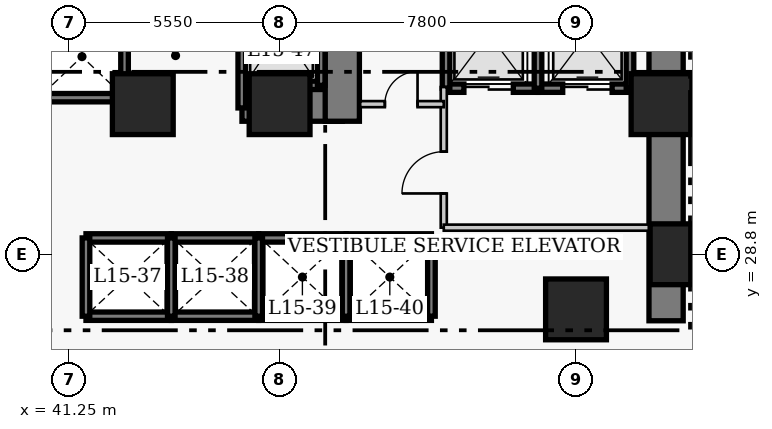
"""IFC4 building model, lengths in metres.
Left out: names, types, materials, properties, quantities, classifications, styles, units other than length and angle.
Written with IfcOpenShell. Run it as: python <this file> out.ifc"""

import sys

from ifc_helpers import new_model, si_unit, direction, frame, frame_2d, origin, origin_2d, place, context, subcontext, project, spatial, rectangle, extrude, element, fill, save


model = new_model("IFC4")
c1 = context("Model", 3, precision=1e-05, world=origin(), true_north=direction((0.0, 1.0)))
c2 = subcontext(c1, "Body", "Model", "MODEL_VIEW")
j1 = project(units=[si_unit("LENGTHUNIT", "METRE"), si_unit("PLANEANGLEUNIT", "RADIAN")], contexts=[c1])
p1 = place(None, origin())
s1 = spatial("IfcSite", under=j1, at=p1, CompositionType="ELEMENT")
p2 = place(p1, origin())
s2 = spatial("IfcBuilding", under=s1, at=p2, CompositionType="ELEMENT")
p3 = place(p2, frame((0.0, 0.0, 64.0)))
s3 = spatial("IfcBuildingStorey", under=s2, at=p3, CompositionType="ELEMENT", Elevation=64.0)
p4 = place(p3, frame((56.97, 27.05, 0.0), z_axis=(0.0, 0.0, 1.0), x_axis=(0.0, 1.0, 0.0)))
e1 = element("IfcWall", 1, at=p4, inside=s3, PredefinedType="SHEAR", context=c2, shape_type="SweptSolid", body=[
    extrude(rectangle(XDim=13.72, YDim=0.9, at=frame_2d((6.86, 0.0))), origin(), (0.0, 0.0, 1.0), 3.8),
])
p5 = place(p3, frame((45.81, 32.75, 0.0), z_axis=(0.0, 0.0, 1.0), x_axis=(1.0, 0.0, 0.0)))
e2 = element("IfcWall", 2, at=p5, inside=s3, PredefinedType="SHEAR", context=c2, shape_type="SweptSolid", body=[
    extrude(rectangle(XDim=2.64, YDim=0.9, at=frame_2d((1.32, 0.0))), origin(), (0.0, 0.0, 1.0), 3.8),
])
p6 = place(p3, frame((48.45, 32.3, 0.0), z_axis=(0.0, 0.0, 1.0), x_axis=(0.0, 1.0, 0.0)))
e3 = element("IfcWall", 3, at=p6, inside=s3, PredefinedType="SHEAR", context=c2, shape_type="SweptSolid", body=[
    extrude(rectangle(XDim=8.02, YDim=0.9, at=frame_2d((4.01, 0.0))), origin(), (0.0, 0.0, 1.0), 3.8),
])
p7 = place(p6, frame((5.9, 0.0, 0.0)))
e4 = element("IfcOpeningElement", 4, at=p7, cuts=e3, PredefinedType="OPENING", context=c2, shape_type="SweptSolid", body=[
    extrude(rectangle(XDim=1.1, YDim=2.15, at=frame_2d((0.55, 1.075))), frame((0.0, 0.46, 0.0), z_axis=(0.0, -1.0, 0.0), x_axis=(1.0, 0.0, 0.0)), (0.0, 0.0, 1.0), 0.92),
])
for number, where, z_axis, x_axis in (
    (5, (57.35, 28.8, 0.0), (0.0, 0.0, 1.0), (1.0, 0.0, 0.0)),
    (6, (43.2, 32.75, 0.0), (0.0, 0.0, 1.0), (1.0, 0.0, 0.0)),
    (7, (46.8, 32.75, 0.0), (0.0, 0.0, 1.0), (1.0, 0.0, 0.0)),
    (8, (54.6, 27.35, 0.0), (0.0, 0.0, 1.0), (1.0, 0.0, 0.0)),
    (9, (56.85, 32.75, 0.0), (0.0, 0.0, 1.0), (1.0, 0.0, 0.0)),
):
    element("IfcColumn", number, at=place(p3, frame(where, z_axis=z_axis, x_axis=x_axis)), inside=s3, PredefinedType="COLUMN", context=c2, shape_type="SweptSolid", body=[
        extrude(rectangle(XDim=1.6, YDim=1.6, at=origin_2d()), origin(), (0.0, 0.0, 1.0), 3.8),
    ])
for number, where, z_axis, x_axis in (
    (10, (41.705, 29.23, 0.0), (0.0, 0.0, 1.0), (1.0, 0.0, 0.0)),
    (11, (41.705, 27.17, 0.0), (0.0, 0.0, 1.0), (1.0, 0.0, 0.0)),
):
    element("IfcWall", number, at=place(p3, frame(where, z_axis=z_axis, x_axis=x_axis)), inside=s3, PredefinedType="SHEAR", context=c2, shape_type="SweptSolid", body=[
        extrude(rectangle(XDim=2.245, YDim=0.22, at=frame_2d((1.123, 0.0))), origin(), (0.0, 0.0, 1.0), 3.8),
    ])
p8 = place(p3, frame((41.705, 27.17, 0.0), z_axis=(0.0, 0.0, 1.0), x_axis=(0.0, 1.0, 0.0)))
e12 = element("IfcWall", 12, at=p8, inside=s3, PredefinedType="SHEAR", context=c2, shape_type="SweptSolid", body=[
    extrude(rectangle(XDim=2.06, YDim=0.2, at=frame_2d((1.03, 0.0))), origin(), (0.0, 0.0, 1.0), 3.8),
])
for number, where, z_axis, x_axis in (
    (13, (43.95, 29.23, 0.0), (0.0, 0.0, 1.0), (1.0, 0.0, 0.0)),
    (14, (43.95, 27.17, 0.0), (0.0, 0.0, 1.0), (1.0, 0.0, 0.0)),
):
    element("IfcWall", number, at=place(p3, frame(where, z_axis=z_axis, x_axis=x_axis)), inside=s3, PredefinedType="SHEAR", context=c2, shape_type="SweptSolid", body=[
        extrude(rectangle(XDim=2.3, YDim=0.22, at=frame_2d((1.15, 0.0))), origin(), (0.0, 0.0, 1.0), 3.8),
    ])
p9 = place(p3, frame((43.95, 27.17, 0.0), z_axis=(0.0, 0.0, 1.0), x_axis=(0.0, 1.0, 0.0)))
e15 = element("IfcWall", 15, at=p9, inside=s3, PredefinedType="SHEAR", context=c2, shape_type="SweptSolid", body=[
    extrude(rectangle(XDim=2.06, YDim=0.2, at=frame_2d((1.03, 0.0))), origin(), (0.0, 0.0, 1.0), 3.8),
])
for number, where, z_axis, x_axis in (
    (16, (46.25, 29.23, 0.0), (0.0, 0.0, 1.0), (1.0, 0.0, 0.0)),
    (17, (46.25, 27.17, 0.0), (0.0, 0.0, 1.0), (1.0, 0.0, 0.0)),
):
    element("IfcWall", number, at=place(p3, frame(where, z_axis=z_axis, x_axis=x_axis)), inside=s3, PredefinedType="SHEAR", context=c2, shape_type="SweptSolid", body=[
        extrude(rectangle(XDim=2.3, YDim=0.22, at=frame_2d((1.15, 0.0))), origin(), (0.0, 0.0, 1.0), 3.8),
    ])
p10 = place(p3, frame((46.25, 27.17, 0.0), z_axis=(0.0, 0.0, 1.0), x_axis=(0.0, 1.0, 0.0)))
e18 = element("IfcWall", 18, at=p10, inside=s3, PredefinedType="SHEAR", context=c2, shape_type="SweptSolid", body=[
    extrude(rectangle(XDim=2.06, YDim=0.2, at=frame_2d((1.03, 0.0))), origin(), (0.0, 0.0, 1.0), 3.8),
])
for number, where, z_axis, x_axis in (
    (19, (48.55, 29.23, 0.0), (0.0, 0.0, 1.0), (1.0, 0.0, 0.0)),
    (20, (48.55, 27.17, 0.0), (0.0, 0.0, 1.0), (1.0, 0.0, 0.0)),
):
    element("IfcWall", number, at=place(p3, frame(where, z_axis=z_axis, x_axis=x_axis)), inside=s3, PredefinedType="SHEAR", context=c2, shape_type="SweptSolid", body=[
        extrude(rectangle(XDim=2.245, YDim=0.22, at=frame_2d((1.123, 0.0))), origin(), (0.0, 0.0, 1.0), 3.8),
    ])
for number, where, z_axis, x_axis in (
    (21, (48.55, 27.17, 0.0), (0.0, 0.0, 1.0), (0.0, 1.0, 0.0)),
    (22, (50.795, 27.17, 0.0), (0.0, 0.0, 1.0), (0.0, 1.0, 0.0)),
):
    element("IfcWall", number, at=place(p3, frame(where, z_axis=z_axis, x_axis=x_axis)), inside=s3, PredefinedType="SHEAR", context=c2, shape_type="SweptSolid", body=[
        extrude(rectangle(XDim=2.06, YDim=0.2, at=frame_2d((1.03, 0.0))), origin(), (0.0, 0.0, 1.0), 3.8),
    ])
p11 = place(p3, frame((40.4, 32.92, 0.0), z_axis=(0.0, 0.0, 1.0), x_axis=(1.0, 0.0, 0.0)))
e23 = element("IfcWall", 23, at=p11, inside=s3, PredefinedType="SHEAR", context=c2, shape_type="SweptSolid", body=[
    extrude(rectangle(XDim=2.32, YDim=0.22, at=frame_2d((1.16, 0.0))), origin(), (0.0, 0.0, 1.0), 3.8),
])
p12 = place(p3, frame((42.72, 32.92, 0.0), z_axis=(0.0, 0.0, 1.0), x_axis=(0.0, 1.0, 0.0)))
e24 = element("IfcWall", 24, at=p12, inside=s3, PredefinedType="SHEAR", context=c2, shape_type="SweptSolid", body=[
    extrude(rectangle(XDim=2.16, YDim=0.2, at=frame_2d((1.08, 0.0))), origin(), (0.0, 0.0, 1.0), 3.8),
])
p13 = place(p3, frame((51.18, 33.17, 0.0), z_axis=(0.0, 0.0, 1.0), x_axis=(1.0, 0.0, 0.0)))
e25 = element("IfcWall", 25, at=p13, inside=s3, PredefinedType="SHEAR", context=c2, shape_type="SweptSolid", body=[
    extrude(rectangle(XDim=2.42, YDim=0.22, at=frame_2d((1.21, 0.0))), origin(), (0.0, 0.0, 1.0), 3.8),
])
p14 = place(p13, frame((0.47, 0.0, 0.0)))
e26 = element("IfcOpeningElement", 26, at=p14, cuts=e25, PredefinedType="OPENING", context=c2, shape_type="SweptSolid", body=[
    extrude(rectangle(XDim=1.3, YDim=2.15, at=frame_2d((0.65, 1.075))), frame((0.0, 0.12, 0.0), z_axis=(0.0, -1.0, 0.0), x_axis=(1.0, 0.0, 0.0)), (0.0, 0.0, 1.0), 0.24),
])
p15 = place(p3, frame((51.18, 33.17, 0.0), z_axis=(0.0, 0.0, 1.0), x_axis=(0.0, 1.0, 0.0)))
e27 = element("IfcWall", 27, at=p15, inside=s3, PredefinedType="SHEAR", context=c2, shape_type="SweptSolid", body=[
    extrude(rectangle(XDim=2.86, YDim=0.2, at=frame_2d((1.43, 0.0))), origin(), (0.0, 0.0, 1.0), 3.8),
])
p16 = place(p3, frame((53.6, 33.17, 0.0), z_axis=(0.0, 0.0, 1.0), x_axis=(1.0, 0.0, 0.0)))
e28 = element("IfcWall", 28, at=p16, inside=s3, PredefinedType="SHEAR", context=c2, shape_type="SweptSolid", body=[
    extrude(rectangle(XDim=2.42, YDim=0.22, at=frame_2d((1.21, 0.0))), origin(), (0.0, 0.0, 1.0), 3.8),
])
p17 = place(p16, frame((0.65, 0.0, 0.0)))
e29 = element("IfcOpeningElement", 29, at=p17, cuts=e28, PredefinedType="OPENING", context=c2, shape_type="SweptSolid", body=[
    extrude(rectangle(XDim=1.3, YDim=2.15, at=frame_2d((0.65, 1.075))), frame((0.0, 0.12, 0.0), z_axis=(0.0, -1.0, 0.0), x_axis=(1.0, 0.0, 0.0)), (0.0, 0.0, 1.0), 0.24),
])
for number, where, z_axis, x_axis in (
    (30, (53.6, 33.17, 0.0), (0.0, 0.0, 1.0), (0.0, 1.0, 0.0)),
    (31, (56.02, 33.17, 0.0), (0.0, 0.0, 1.0), (0.0, 1.0, 0.0)),
):
    element("IfcWall", number, at=place(p3, frame(where, z_axis=z_axis, x_axis=x_axis)), inside=s3, PredefinedType="SHEAR", context=c2, shape_type="SweptSolid", body=[
        extrude(rectangle(XDim=2.86, YDim=0.2, at=frame_2d((1.43, 0.0))), origin(), (0.0, 0.0, 1.0), 3.8),
    ])
p18 = place(p3, frame((45.805, 33.245, 0.0), z_axis=(0.0, 0.0, 1.0), x_axis=(1.0, 0.0, 0.0)))
e32 = element("IfcWall", 32, at=p18, inside=s3, PredefinedType="SHEAR", context=c2, shape_type="SweptSolid", body=[
    extrude(rectangle(XDim=2.09, YDim=0.22, at=frame_2d((1.045, 0.0))), origin(), (0.0, 0.0, 1.0), 3.8),
])
p19 = place(p3, frame((45.805, 32.65, 0.0), z_axis=(0.0, 0.0, 1.0), x_axis=(0.0, 1.0, 0.0)))
e33 = element("IfcWall", 33, at=p19, inside=s3, PredefinedType="SHEAR", context=c2, shape_type="SweptSolid", body=[
    extrude(rectangle(XDim=3.505, YDim=0.2, at=frame_2d((1.752, 0.0))), origin(), (0.0, 0.0, 1.0), 3.8),
])
p20 = place(p3, frame((47.895, 33.245, 0.0), z_axis=(0.0, 0.0, 1.0), x_axis=(0.0, 1.0, 0.0)))
e34 = element("IfcWall", 34, at=p20, inside=s3, PredefinedType="SHEAR", context=c2, shape_type="SweptSolid", body=[
    extrude(rectangle(XDim=2.91, YDim=0.2, at=frame_2d((1.455, 0.0))), origin(), (0.0, 0.0, 1.0), 3.8),
])
p21 = place(p3, frame((51.12, 29.5, 0.0), z_axis=(0.0, 0.0, 1.0), x_axis=(0.0, 1.0, 0.0)))
e35 = element("IfcWall", 35, at=p21, inside=s3, PredefinedType="PARTITIONING", context=c2, shape_type="SweptSolid", body=[
    extrude(rectangle(XDim=3.7, YDim=0.16, at=frame_2d((1.85, 0.0))), origin(), (0.0, 0.0, 1.0), 3.54),
])
p22 = place(p21, frame((0.9, 0.0, 0.0)))
e36 = element("IfcOpeningElement", 36, at=p22, cuts=e35, PredefinedType="OPENING", context=c2, shape_type="SweptSolid", body=[
    extrude(rectangle(XDim=1.1, YDim=2.15, at=frame_2d((0.55, 1.075))), frame((0.0, 0.09, 0.0), z_axis=(0.0, -1.0, 0.0), x_axis=(1.0, 0.0, 0.0)), (0.0, 0.0, 1.0), 0.18),
])
p23 = place(p3, frame((51.12, 29.5, 0.0), z_axis=(0.0, 0.0, 1.0), x_axis=(1.0, 0.0, 0.0)))
e37 = element("IfcWall", 37, at=p23, inside=s3, PredefinedType="PARTITIONING", context=c2, shape_type="SweptSolid", body=[
    extrude(rectangle(XDim=5.63, YDim=0.16, at=frame_2d((2.815, 0.0))), origin(), (0.0, 0.0, 1.0), 3.54),
])
p24 = place(p3, frame((48.92, 32.75, 0.0), z_axis=(0.0, 0.0, 1.0), x_axis=(1.0, 0.0, 0.0)))
e38 = element("IfcWall", 38, at=p24, inside=s3, PredefinedType="PARTITIONING", context=c2, shape_type="SweptSolid", body=[
    extrude(rectangle(XDim=2.2, YDim=0.16, at=frame_2d((1.1, 0.0))), origin(), (0.0, 0.0, 1.0), 3.54),
])
p25 = place(p24, frame((0.65, 0.0, 0.0)))
e39 = element("IfcOpeningElement", 39, at=p25, cuts=e38, PredefinedType="OPENING", context=c2, shape_type="SweptSolid", body=[
    extrude(rectangle(XDim=0.86, YDim=2.05, at=frame_2d((0.43, 1.025))), frame((0.0, 0.09, 0.0), z_axis=(0.0, -1.0, 0.0), x_axis=(1.0, 0.0, 0.0)), (0.0, 0.0, 1.0), 0.18),
])
p26 = place(p14, origin())
e40 = element("IfcDoor", 40, at=p26, inside=s3, OperationType="DOUBLE_DOOR_SLIDING", PredefinedType="DOOR", context=c2, shape_type="SweptSolid", body=[
    extrude(rectangle(XDim=1.3, YDim=2.15, at=frame_2d((0.65, 1.075))), frame((0.0, 0.025, 0.0), z_axis=(0.0, -1.0, 0.0), x_axis=(1.0, 0.0, 0.0)), (0.0, 0.0, 1.0), 0.05),
])
fill(e26, e40)
p27 = place(p17, origin())
e41 = element("IfcDoor", 41, at=p27, inside=s3, OperationType="DOUBLE_DOOR_SLIDING", PredefinedType="DOOR", context=c2, shape_type="SweptSolid", body=[
    extrude(rectangle(XDim=1.3, YDim=2.15, at=frame_2d((0.65, 1.075))), frame((0.0, 0.025, 0.0), z_axis=(0.0, -1.0, 0.0), x_axis=(1.0, 0.0, 0.0)), (0.0, 0.0, 1.0), 0.05),
])
fill(e29, e41)
p28 = place(p22, origin())
e42 = element("IfcDoor", 42, at=p28, inside=s3, OperationType="SINGLE_SWING_LEFT", PredefinedType="DOOR", context=c2, shape_type="SweptSolid", body=[
    extrude(rectangle(XDim=1.1, YDim=2.15, at=frame_2d((0.55, 1.075))), frame((0.0, 0.025, 0.0), z_axis=(0.0, -1.0, 0.0), x_axis=(1.0, 0.0, 0.0)), (0.0, 0.0, 1.0), 0.05),
])
fill(e36, e42)
p29 = place(p25, origin())
e43 = element("IfcDoor", 43, at=p29, inside=s3, OperationType="SINGLE_SWING_RIGHT", PredefinedType="DOOR", context=c2, shape_type="SweptSolid", body=[
    extrude(rectangle(XDim=0.86, YDim=2.05, at=frame_2d((0.43, 1.025))), frame((0.0, 0.025, 0.0), z_axis=(0.0, -1.0, 0.0), x_axis=(1.0, 0.0, 0.0)), (0.0, 0.0, 1.0), 0.05),
])
fill(e39, e43)
save(model, sys.argv[1])
